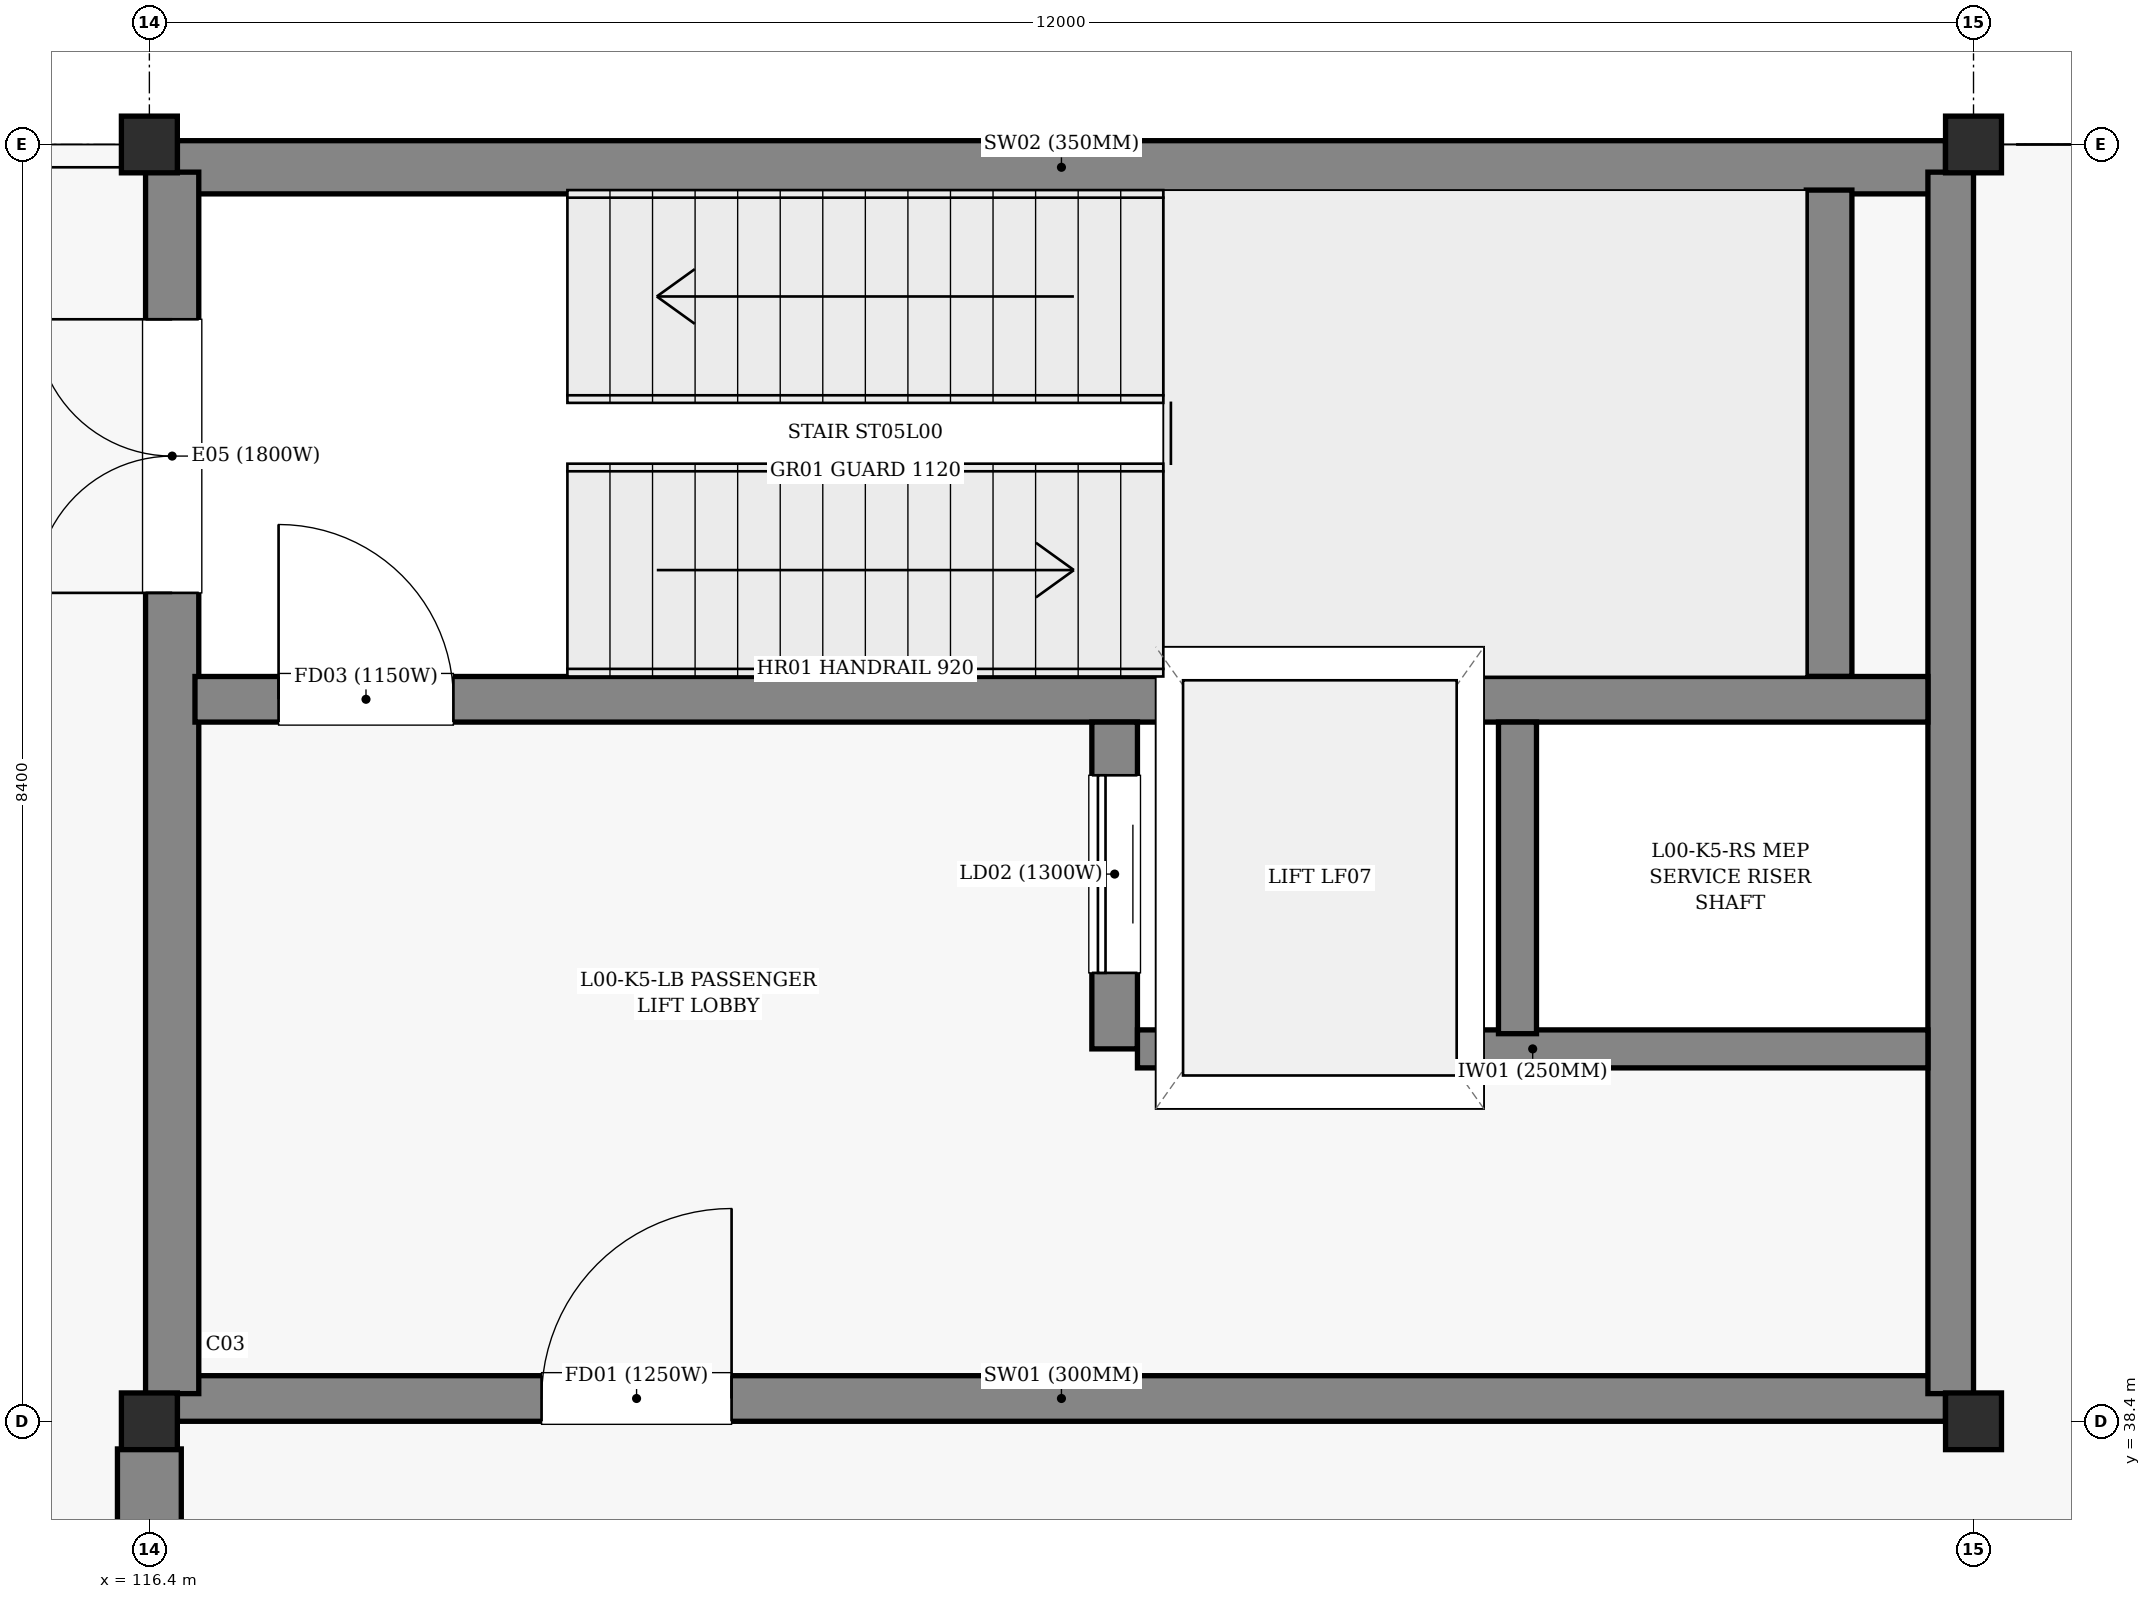
"""IFC4 building model, lengths in metres.
Left out: names, types, materials, properties, quantities, classifications, styles, units other than length and angle.
Written with IfcOpenShell. Run it as: python <this file> out.ifc"""

import sys

from ifc_helpers import new_model, si_unit, direction, frame, frame_2d, origin, origin_2d, place, context, subcontext, project, spatial, rectangle, i_section, extrude, element, fill, save


model = new_model("IFC4")
c1 = context("Model", 3, precision=1e-05, world=origin(), true_north=direction((0.0, 1.0)))
c2 = subcontext(c1, "Body", "Model", "MODEL_VIEW")
j1 = project(units=[si_unit("LENGTHUNIT", "METRE"), si_unit("PLANEANGLEUNIT", "RADIAN")], contexts=[c1])
p1 = place(None, origin())
s1 = spatial("IfcSite", under=j1, at=p1, CompositionType="ELEMENT")
p2 = place(p1, origin())
s2 = spatial("IfcBuilding", under=s1, at=p2, CompositionType="ELEMENT")
p3 = place(p2, origin())
s3 = spatial("IfcBuildingStorey", under=s2, at=p3, CompositionType="ELEMENT", Elevation=0.0)
for number, where, z_axis, x_axis in (
    (1, (116.4, 38.4, 0.0), (0.0, 0.0, 1.0), (1.0, 0.0, 0.0)),
    (2, (116.4, 46.8, 0.0), (0.0, 0.0, 1.0), (1.0, 0.0, 0.0)),
    (3, (128.4, 38.4, 0.0), (0.0, 0.0, 1.0), (1.0, 0.0, 0.0)),
    (4, (128.4, 46.8, 0.0), (0.0, 0.0, 1.0), (1.0, 0.0, 0.0)),
):
    element("IfcColumn", number, at=place(p3, frame(where, z_axis=z_axis, x_axis=x_axis)), inside=s3, PredefinedType="COLUMN", context=c2, shape_type="SweptSolid", body=[
        extrude(i_section(OverallWidth=0.373, OverallDepth=0.368, WebThickness=0.014, FlangeThickness=0.024, FilletRadius=0.015, at=origin_2d()), origin(), (0.0, 0.0, 1.0), 5.4),
    ])
p4 = place(p3, frame((116.4, 21.789, 0.0), z_axis=(0.0, 0.0, 1.0), x_axis=(0.0, 1.0, 0.0)))
e5 = element("IfcWall", 5, at=p4, inside=s3, PredefinedType="STANDARD", context=c2, shape_type="SweptSolid", body=[
    extrude(rectangle(XDim=16.429, YDim=0.42, at=frame_2d((8.215, 0.0))), origin(), (0.0, 0.0, 1.0), 4.335),
])
p5 = place(p4, frame((7.02, 0.0, 0.0)))
e6 = element("IfcOpeningElement", 6, at=p5, cuts=e5, PredefinedType="OPENING", context=c2, shape_type="SweptSolid", body=[
    extrude(rectangle(XDim=2.2, YDim=2.35, at=frame_2d((1.1, 1.175))), frame((0.0, 0.22, 0.0), z_axis=(0.0, -1.0, 0.0), x_axis=(1.0, 0.0, 0.0)), (0.0, 0.0, 1.0), 0.44),
])
p6 = place(p4, frame((0.85, 0.0, 0.75)))
e7 = element("IfcOpeningElement", 7, at=p6, cuts=e5, PredefinedType="OPENING", context=c2, shape_type="SweptSolid", body=[
    extrude(rectangle(XDim=1.8, YDim=2.4, at=frame_2d((0.9, 1.2))), frame((0.0, 0.22, 0.0), z_axis=(0.0, -1.0, 0.0), x_axis=(1.0, 0.0, 0.0)), (0.0, 0.0, 1.0), 0.44),
])
p7 = place(p3, frame((116.584, 46.65, 0.0), z_axis=(0.0, 0.0, 1.0), x_axis=(1.0, 0.0, 0.0)))
e8 = element("IfcWall", 8, at=p7, inside=s3, PredefinedType="SHEAR", context=c2, shape_type="SweptSolid", body=[
    extrude(rectangle(XDim=11.631, YDim=0.35, at=frame_2d((5.815, 0.0))), origin(), (0.0, 0.0, 1.0), 5.18),
])
p8 = place(p3, frame((116.584, 38.55, 0.0), z_axis=(0.0, 0.0, 1.0), x_axis=(1.0, 0.0, 0.0)))
e9 = element("IfcWall", 9, at=p8, inside=s3, PredefinedType="SHEAR", context=c2, shape_type="SweptSolid", body=[
    extrude(rectangle(XDim=11.631, YDim=0.3, at=frame_2d((5.815, 0.0))), origin(), (0.0, 0.0, 1.0), 5.18),
])
p9 = place(p8, frame((2.396, 0.0, 0.0)))
e10 = element("IfcOpeningElement", 10, at=p9, cuts=e9, PredefinedType="OPENING", context=c2, shape_type="SweptSolid", body=[
    extrude(rectangle(XDim=1.25, YDim=2.15, at=frame_2d((0.625, 1.075))), frame((0.0, 0.16, 0.0), z_axis=(0.0, -1.0, 0.0), x_axis=(1.0, 0.0, 0.0)), (0.0, 0.0, 1.0), 0.32),
])
p10 = place(p3, frame((116.55, 38.582, 0.0), z_axis=(0.0, 0.0, 1.0), x_axis=(0.0, 1.0, 0.0)))
e11 = element("IfcWall", 11, at=p10, inside=s3, PredefinedType="SHEAR", context=c2, shape_type="SweptSolid", body=[
    extrude(rectangle(XDim=8.036, YDim=0.35, at=frame_2d((4.018, 0.0))), origin(), (0.0, 0.0, 1.0), 5.18),
])
p11 = place(p10, frame((5.268, 0.0, 0.0)))
e12 = element("IfcOpeningElement", 12, at=p11, cuts=e11, PredefinedType="OPENING", context=c2, shape_type="SweptSolid", body=[
    extrude(rectangle(XDim=1.8, YDim=2.2, at=frame_2d((0.9, 1.1))), frame((0.0, 0.185, 0.0), z_axis=(0.0, -1.0, 0.0), x_axis=(1.0, 0.0, 0.0)), (0.0, 0.0, 1.0), 0.37),
])
p12 = place(p3, frame((128.25, 38.582, 0.0), z_axis=(0.0, 0.0, 1.0), x_axis=(0.0, 1.0, 0.0)))
e13 = element("IfcWall", 13, at=p12, inside=s3, PredefinedType="SHEAR", context=c2, shape_type="SweptSolid", body=[
    extrude(rectangle(XDim=8.036, YDim=0.3, at=frame_2d((4.018, 0.0))), origin(), (0.0, 0.0, 1.0), 5.18),
])
p13 = place(p3, frame((127.45, 43.3, 0.0), z_axis=(0.0, 0.0, 1.0), x_axis=(0.0, 1.0, 0.0)))
e14 = element("IfcWall", 14, at=p13, inside=s3, PredefinedType="SHEAR", context=c2, shape_type="SweptSolid", body=[
    extrude(rectangle(XDim=3.2, YDim=0.3, at=frame_2d((1.6, 0.0))), origin(), (0.0, 0.0, 1.0), 5.18),
])
p14 = place(p3, frame((116.7, 43.15, 0.0), z_axis=(0.0, 0.0, 1.0), x_axis=(1.0, 0.0, 0.0)))
e15 = element("IfcWall", 15, at=p14, inside=s3, PredefinedType="SHEAR", context=c2, shape_type="SweptSolid", body=[
    extrude(rectangle(XDim=11.4, YDim=0.3, at=frame_2d((5.7, 0.0))), origin(), (0.0, 0.0, 1.0), 5.18),
])
p15 = place(p14, frame((0.55, 0.0, 0.0)))
e16 = element("IfcOpeningElement", 16, at=p15, cuts=e15, PredefinedType="OPENING", context=c2, shape_type="SweptSolid", body=[
    extrude(rectangle(XDim=1.15, YDim=2.15, at=frame_2d((0.575, 1.075))), frame((0.0, 0.16, 0.0), z_axis=(0.0, -1.0, 0.0), x_axis=(1.0, 0.0, 0.0)), (0.0, 0.0, 1.0), 0.32),
])
p16 = place(p3, frame((122.75, 40.85, 0.0), z_axis=(0.0, 0.0, 1.0), x_axis=(0.0, 1.0, 0.0)))
e17 = element("IfcWall", 17, at=p16, inside=s3, PredefinedType="SHEAR", context=c2, shape_type="SweptSolid", body=[
    extrude(rectangle(XDim=2.15, YDim=0.3, at=frame_2d((1.075, 0.0))), origin(), (0.0, 0.0, 1.0), 5.18),
])
p17 = place(p16, frame((0.5, 0.0, 0.0)))
e18 = element("IfcOpeningElement", 18, at=p17, cuts=e17, PredefinedType="OPENING", context=c2, shape_type="SweptSolid", body=[
    extrude(rectangle(XDim=1.3, YDim=2.3, at=frame_2d((0.65, 1.15))), frame((0.0, 0.16, 0.0), z_axis=(0.0, -1.0, 0.0), x_axis=(1.0, 0.0, 0.0)), (0.0, 0.0, 1.0), 0.32),
])
p18 = place(p3, frame((122.9, 40.85, 0.0), z_axis=(0.0, 0.0, 1.0), x_axis=(1.0, 0.0, 0.0)))
e19 = element("IfcWall", 19, at=p18, inside=s3, PredefinedType="PARTITIONING", context=c2, shape_type="SweptSolid", body=[
    extrude(rectangle(XDim=5.2, YDim=0.25, at=frame_2d((2.6, 0.0))), origin(), (0.0, 0.0, 1.0), 4.325),
])
p19 = place(p3, frame((125.4, 40.95, 0.0), z_axis=(0.0, 0.0, 1.0), x_axis=(0.0, 1.0, 0.0)))
e20 = element("IfcWall", 20, at=p19, inside=s3, PredefinedType="PARTITIONING", context=c2, shape_type="SweptSolid", body=[
    extrude(rectangle(XDim=2.05, YDim=0.25, at=frame_2d((1.025, 0.0))), origin(), (0.0, 0.0, 1.0), 4.325),
])
p20 = place(p9, origin())
e21 = element("IfcDoor", 21, at=p20, inside=s3, OperationType="SINGLE_SWING_RIGHT", PredefinedType="DOOR", context=c2, shape_type="SweptSolid", body=[
    extrude(rectangle(XDim=1.25, YDim=2.15, at=frame_2d((0.625, 1.075))), frame((0.0, 0.025, 0.0), z_axis=(0.0, -1.0, 0.0), x_axis=(1.0, 0.0, 0.0)), (0.0, 0.0, 1.0), 0.05),
])
fill(e10, e21)
p21 = place(p11, origin())
e22 = element("IfcDoor", 22, at=p21, inside=s3, OperationType="DOUBLE_DOOR_SINGLE_SWING", PredefinedType="DOOR", context=c2, shape_type="SweptSolid", body=[
    extrude(rectangle(XDim=1.8, YDim=2.2, at=frame_2d((0.9, 1.1))), frame((0.0, 0.025, 0.0), z_axis=(0.0, -1.0, 0.0), x_axis=(1.0, 0.0, 0.0)), (0.0, 0.0, 1.0), 0.05),
])
fill(e12, e22)
p22 = place(p15, origin())
e23 = element("IfcDoor", 23, at=p22, inside=s3, OperationType="SINGLE_SWING_LEFT", PredefinedType="DOOR", context=c2, shape_type="SweptSolid", body=[
    extrude(rectangle(XDim=1.15, YDim=2.15, at=frame_2d((0.575, 1.075))), frame((0.0, 0.025, 0.0), z_axis=(0.0, -1.0, 0.0), x_axis=(1.0, 0.0, 0.0)), (0.0, 0.0, 1.0), 0.05),
])
fill(e16, e23)
p23 = place(p17, origin())
e24 = element("IfcDoor", 24, at=p23, inside=s3, OperationType="SLIDING_TO_LEFT", PredefinedType="DOOR", context=c2, shape_type="SweptSolid", body=[
    extrude(rectangle(XDim=1.3, YDim=2.3, at=frame_2d((0.65, 1.15))), frame((0.0, 0.025, 0.0), z_axis=(0.0, -1.0, 0.0), x_axis=(1.0, 0.0, 0.0)), (0.0, 0.0, 1.0), 0.05),
])
fill(e18, e24)
save(model, sys.argv[1])
